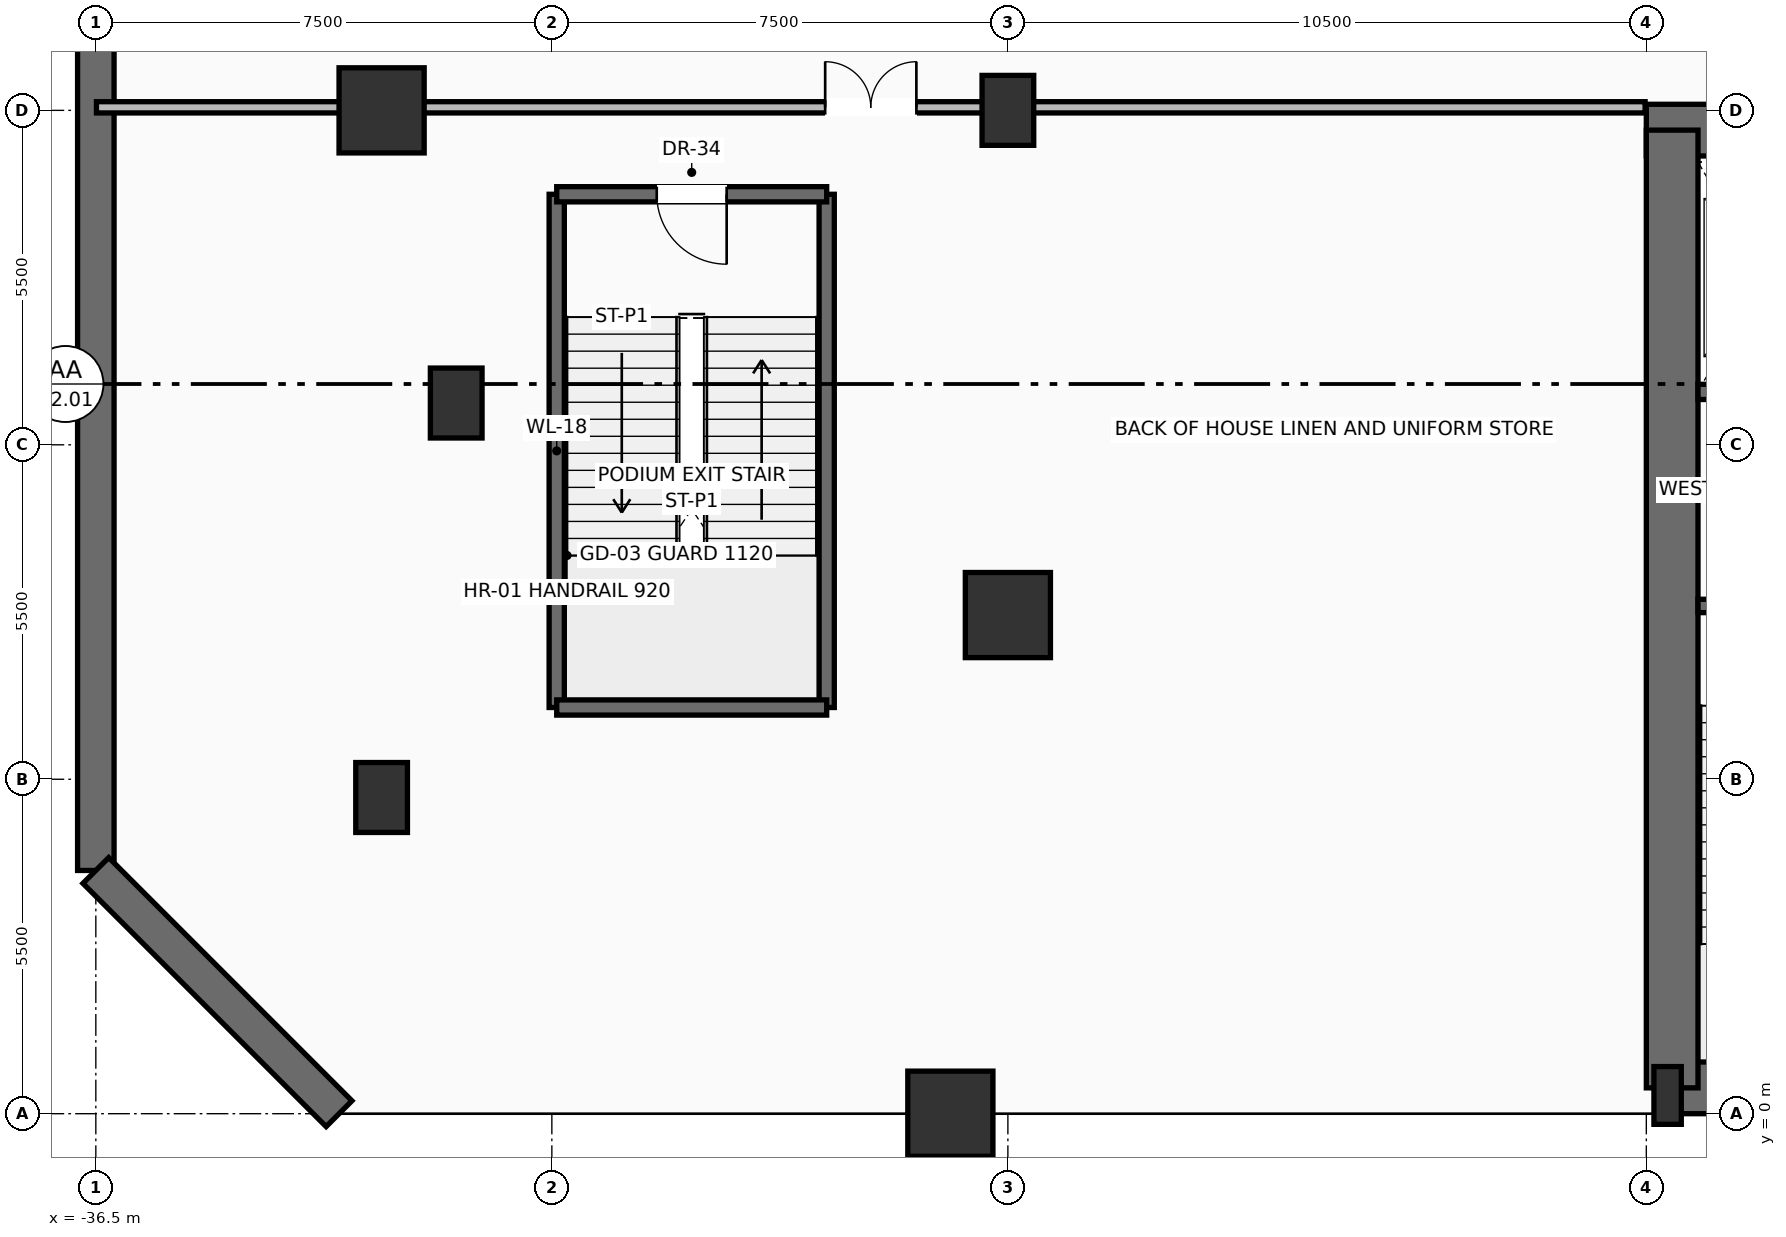
"""IFC4 building model, lengths in metres.
Left out: names, types, materials, properties, quantities, classifications, styles, units other than length and angle.
Written with IfcOpenShell. Run it as: python <this file> out.ifc"""

import sys

from ifc_helpers import new_model, si_unit, direction, frame, frame_2d, origin, origin_2d, place, context, subcontext, project, spatial, rectangle, hollow_rectangle, extrude, source, transform, mapped, element, fill, save


model = new_model("IFC4")
c1 = context("Model", 3, precision=1e-05, world=origin(), true_north=direction((0.0, 1.0)))
c2 = subcontext(c1, "Body", "Model", "MODEL_VIEW")
j1 = project(units=[si_unit("LENGTHUNIT", "METRE"), si_unit("PLANEANGLEUNIT", "RADIAN")], contexts=[c1])
p1 = place(None, origin())
s1 = spatial("IfcSite", under=j1, at=p1, CompositionType="ELEMENT")
p2 = place(p1, origin())
s2 = spatial("IfcBuilding", under=s1, at=p2, CompositionType="ELEMENT")
p3 = place(p2, frame((0.0, 0.0, -5.0)))
s3 = spatial("IfcBuildingStorey", under=s2, at=p3, CompositionType="ELEMENT", Elevation=-5.0)
p4 = place(p3, frame((-36.5, 46.0, 0.0), z_axis=(0.0, 0.0, 1.0), x_axis=(0.0, -1.0, 0.0)))
e1 = element("IfcWall", 1, at=p4, inside=s3, PredefinedType="SOLIDWALL", context=c2, shape_type="SweptSolid", body=[
    extrude(rectangle(XDim=42.0, YDim=0.6, at=frame_2d((21.0, 0.0))), origin(), (0.0, 0.0, 1.0), 4.64),
])
p5 = place(p3, frame((-36.5, 4.0, 0.0), z_axis=(0.0, 0.0, 1.0), x_axis=(0.707106781187, -0.707106781187, 0.0)))
e2 = element("IfcWall", 2, at=p5, inside=s3, PredefinedType="SOLIDWALL", context=c2, shape_type="SweptSolid", body=[
    extrude(rectangle(XDim=5.657, YDim=0.6, at=frame_2d((2.828, 0.0))), origin(), (0.0, 0.0, 1.0), 4.64),
])
p6 = place(p3, frame((-10.65, 0.425, 0.0), z_axis=(0.0, 0.0, 1.0), x_axis=(1.0, 0.0, 0.0)))
e3 = element("IfcWall", 3, at=p6, inside=s3, PredefinedType="SHEAR", context=c2, shape_type="SweptSolid", body=[
    extrude(rectangle(XDim=21.3, YDim=0.85, at=frame_2d((10.65, 0.0))), origin(), (0.0, 0.0, 1.0), 4.64),
])
p7 = place(p3, frame((-11.0, 16.175, 0.0), z_axis=(0.0, 0.0, 1.0), x_axis=(1.0, 0.0, 0.0)))
e4 = element("IfcWall", 4, at=p7, inside=s3, PredefinedType="SHEAR", context=c2, shape_type="SweptSolid", body=[
    extrude(rectangle(XDim=22.0, YDim=0.85, at=frame_2d((11.0, 0.0))), origin(), (0.0, 0.0, 1.0), 4.64),
])
p8 = place(p7, frame((3.57, 0.0, 0.0)))
e5 = element("IfcOpeningElement", 5, at=p8, cuts=e4, PredefinedType="OPENING", context=c2, shape_type="SweptSolid", body=[
    extrude(rectangle(XDim=1.3, YDim=2.3, at=frame_2d((0.65, 1.15))), frame((0.0, 0.435, 0.0), z_axis=(0.0, -1.0, 0.0), x_axis=(1.0, 0.0, 0.0)), (0.0, 0.0, 1.0), 0.87),
])
p9 = place(p7, frame((10.0, 0.0, 0.0)))
e6 = element("IfcOpeningElement", 6, at=p9, cuts=e4, PredefinedType="OPENING", context=c2, shape_type="SweptSolid", body=[
    extrude(rectangle(XDim=2.0, YDim=2.4, at=frame_2d((1.0, 1.2))), frame((0.0, 0.435, 0.0), z_axis=(0.0, -1.0, 0.0), x_axis=(1.0, 0.0, 0.0)), (0.0, 0.0, 1.0), 0.87),
])
p10 = place(p3, frame((-10.575, 0.425, 0.0), z_axis=(0.0, 0.0, 1.0), x_axis=(0.0, 1.0, 0.0)))
e7 = element("IfcWall", 7, at=p10, inside=s3, PredefinedType="SHEAR", context=c2, shape_type="SweptSolid", body=[
    extrude(rectangle(XDim=15.75, YDim=0.85, at=frame_2d((7.875, 0.0))), origin(), (0.0, 0.0, 1.0), 4.64),
])
m1 = source(origin(), c2, "Body", "SweptSolid", [
    extrude(rectangle(XDim=0.45, YDim=0.95, at=origin_2d()), origin(), (0.0, 0.0, 1.0), 5.0),
])
p11 = place(p3, frame((-10.65, 0.3, 0.0), z_axis=(0.0, 0.0, 1.0), x_axis=(1.0, 0.0, 0.0)))
e8 = element("IfcColumn", 8, at=p11, inside=s3, PredefinedType="PILASTER", context=c2, shape_type="MappedRepresentation", body=[
    mapped(m1, transform((0.0, 0.0, 0.0), scale=1.0)),
])
m2 = source(origin(), c2, "Body", "SweptSolid", [
    extrude(hollow_rectangle(XDim=1.4, YDim=1.4, WallThickness=0.07, at=origin_2d()), origin(), (0.0, 0.0, 1.0), 5.0),
])
for number, where, z_axis, x_axis in (
    (9, (-22.446, 0.0, 0.0), (0.0, 0.0, 1.0), (1.0, 0.0, 0.0)),
    (10, (-21.5, 8.2, 0.0), (0.0, 0.0, 1.0), (1.0, 0.0, 0.0)),
    (11, (-31.8, 16.5, 0.0), (0.0, 0.0, 1.0), (1.0, 0.0, 0.0)),
):
    element("IfcColumn", number, at=place(p3, frame(where, z_axis=z_axis, x_axis=x_axis)), inside=s3, PredefinedType="COLUMN", context=c2, shape_type="MappedRepresentation", body=[
        mapped(m2, transform((0.0, 0.0, 0.0), scale=1.0)),
    ])
m3 = source(origin(), c2, "Body", "SweptSolid", [
    extrude(rectangle(XDim=0.85, YDim=1.15, at=origin_2d()), origin(), (0.0, 0.0, 1.0), 5.0),
])
for number, where, z_axis, x_axis in (
    (12, (-21.5, 16.5, 0.0), (0.0, 0.0, 1.0), (1.0, 0.0, 0.0)),
    (13, (-31.8, 5.2, 0.0), (0.0, 0.0, 1.0), (1.0, 0.0, 0.0)),
    (14, (-30.573, 11.687, 0.0), (0.0, 0.0, 1.0), (1.0, 0.0, 0.0)),
):
    element("IfcColumn", number, at=place(p3, frame(where, z_axis=z_axis, x_axis=x_axis)), inside=s3, PredefinedType="COLUMN", context=c2, shape_type="MappedRepresentation", body=[
        mapped(m3, transform((0.0, 0.0, 0.0), scale=1.0)),
    ])
p12 = place(p3, frame((-5.5, 8.35, 0.0), z_axis=(0.0, 0.0, 1.0), x_axis=(-1.0, 0.0, 0.0)))
e15 = element("IfcWall", 15, at=p12, inside=s3, PredefinedType="SOLIDWALL", context=c2, shape_type="SweptSolid", body=[
    extrude(rectangle(XDim=4.65, YDim=0.22, at=frame_2d((2.325, 0.0))), origin(), (0.0, 0.0, 1.0), 4.64),
])
p13 = place(p12, frame((2.5, 0.0, 0.0)))
e16 = element("IfcOpeningElement", 16, at=p13, cuts=e15, PredefinedType="OPENING", context=c2, shape_type="SweptSolid", body=[
    extrude(rectangle(XDim=1.15, YDim=2.2, at=frame_2d((0.575, 1.1))), frame((0.0, 0.12, 0.0), z_axis=(0.0, -1.0, 0.0), x_axis=(1.0, 0.0, 0.0)), (0.0, 0.0, 1.0), 0.24),
])
p14 = place(p3, frame((-5.5, 11.87, 0.0), z_axis=(0.0, 0.0, 1.0), x_axis=(-1.0, 0.0, 0.0)))
e17 = element("IfcWall", 17, at=p14, inside=s3, PredefinedType="SOLIDWALL", context=c2, shape_type="SweptSolid", body=[
    extrude(rectangle(XDim=4.65, YDim=0.25, at=frame_2d((2.325, 0.0))), origin(), (0.0, 0.0, 1.0), 4.64),
])
p15 = place(p14, frame((2.95, 0.0, 0.0)))
e18 = element("IfcOpeningElement", 18, at=p15, cuts=e17, PredefinedType="OPENING", context=c2, shape_type="SweptSolid", body=[
    extrude(rectangle(XDim=1.2, YDim=2.25, at=frame_2d((0.6, 1.125))), frame((0.0, 0.135, 0.0), z_axis=(0.0, -1.0, 0.0), x_axis=(1.0, 0.0, 0.0)), (0.0, 0.0, 1.0), 0.27),
])
for number, where, z_axis, x_axis in (
    (19, (-28.92, 6.68, 0.0), (0.0, 0.0, 1.0), (0.0, 1.0, 0.0)),
    (20, (-24.48, 6.68, 0.0), (0.0, 0.0, 1.0), (0.0, 1.0, 0.0)),
):
    element("IfcWall", number, at=place(p3, frame(where, z_axis=z_axis, x_axis=x_axis)), inside=s3, PredefinedType="SOLIDWALL", context=c2, shape_type="SweptSolid", body=[
        extrude(rectangle(XDim=8.44, YDim=0.25, at=frame_2d((4.22, 0.0))), origin(), (0.0, 0.0, 1.0), 4.64),
    ])
p16 = place(p3, frame((-28.92, 6.68, 0.0), z_axis=(0.0, 0.0, 1.0), x_axis=(1.0, 0.0, 0.0)))
e21 = element("IfcWall", 21, at=p16, inside=s3, PredefinedType="SOLIDWALL", context=c2, shape_type="SweptSolid", body=[
    extrude(rectangle(XDim=4.44, YDim=0.25, at=frame_2d((2.22, 0.0))), origin(), (0.0, 0.0, 1.0), 4.64),
])
p17 = place(p3, frame((-24.48, 15.12, 0.0), z_axis=(0.0, 0.0, 1.0), x_axis=(-1.0, 0.0, 0.0)))
e22 = element("IfcWall", 22, at=p17, inside=s3, PredefinedType="SOLIDWALL", context=c2, shape_type="SweptSolid", body=[
    extrude(rectangle(XDim=4.44, YDim=0.25, at=frame_2d((2.22, 0.0))), origin(), (0.0, 0.0, 1.0), 4.64),
])
p18 = place(p17, frame((1.645, 0.0, 0.0)))
e23 = element("IfcOpeningElement", 23, at=p18, cuts=e22, PredefinedType="OPENING", context=c2, shape_type="SweptSolid", body=[
    extrude(rectangle(XDim=1.15, YDim=2.2, at=frame_2d((0.575, 1.1))), frame((0.0, 0.135, 0.0), z_axis=(0.0, -1.0, 0.0), x_axis=(1.0, 0.0, 0.0)), (0.0, 0.0, 1.0), 0.27),
])
p19 = place(p3, frame((-36.49, 16.55, 0.0), z_axis=(0.0, 0.0, 1.0), x_axis=(1.0, 0.0, 0.0)))
e24 = element("IfcWall", 24, at=p19, inside=s3, PredefinedType="PARTITIONING", context=c2, shape_type="SweptSolid", body=[
    extrude(rectangle(XDim=25.47, YDim=0.185, at=frame_2d((12.735, 0.0))), origin(), (0.0, 0.0, 1.0), 3.592),
])
p20 = place(p19, frame((11.985, 0.0, 0.0)))
e25 = element("IfcOpeningElement", 25, at=p20, cuts=e24, PredefinedType="OPENING", context=c2, shape_type="SweptSolid", body=[
    extrude(rectangle(XDim=1.5, YDim=2.25, at=frame_2d((0.75, 1.125))), frame((0.0, 0.103, 0.0), z_axis=(0.0, -1.0, 0.0), x_axis=(1.0, 0.0, 0.0)), (0.0, 0.0, 1.0), 0.205),
])
m4 = source(origin(), c2, "Body", "SweptSolid", [
    extrude(rectangle(XDim=1.15, YDim=2.2, at=frame_2d((0.575, 1.1))), frame((0.0, 0.025, 0.0), z_axis=(0.0, -1.0, 0.0), x_axis=(1.0, 0.0, 0.0)), (0.0, 0.0, 1.0), 0.05),
])
p21 = place(p18, origin())
e26 = element("IfcDoor", 26, at=p21, inside=s3, OperationType="SINGLE_SWING_LEFT", PredefinedType="DOOR", context=c2, shape_type="MappedRepresentation", body=[
    mapped(m4, transform((0.0, 0.0, 0.0), scale=1.0)),
])
fill(e23, e26)
m5 = source(origin(), c2, "Body", "SweptSolid", [
    extrude(rectangle(XDim=1.5, YDim=2.25, at=frame_2d((0.75, 1.125))), frame((0.0, 0.025, 0.0), z_axis=(0.0, -1.0, 0.0), x_axis=(1.0, 0.0, 0.0)), (0.0, 0.0, 1.0), 0.05),
])
p22 = place(p20, origin())
e27 = element("IfcDoor", 27, at=p22, inside=s3, OperationType="DOUBLE_DOOR_SINGLE_SWING", PredefinedType="DOOR", context=c2, shape_type="MappedRepresentation", body=[
    mapped(m5, transform((0.0, 0.0, 0.0), scale=1.0)),
])
fill(e25, e27)
save(model, sys.argv[1])
